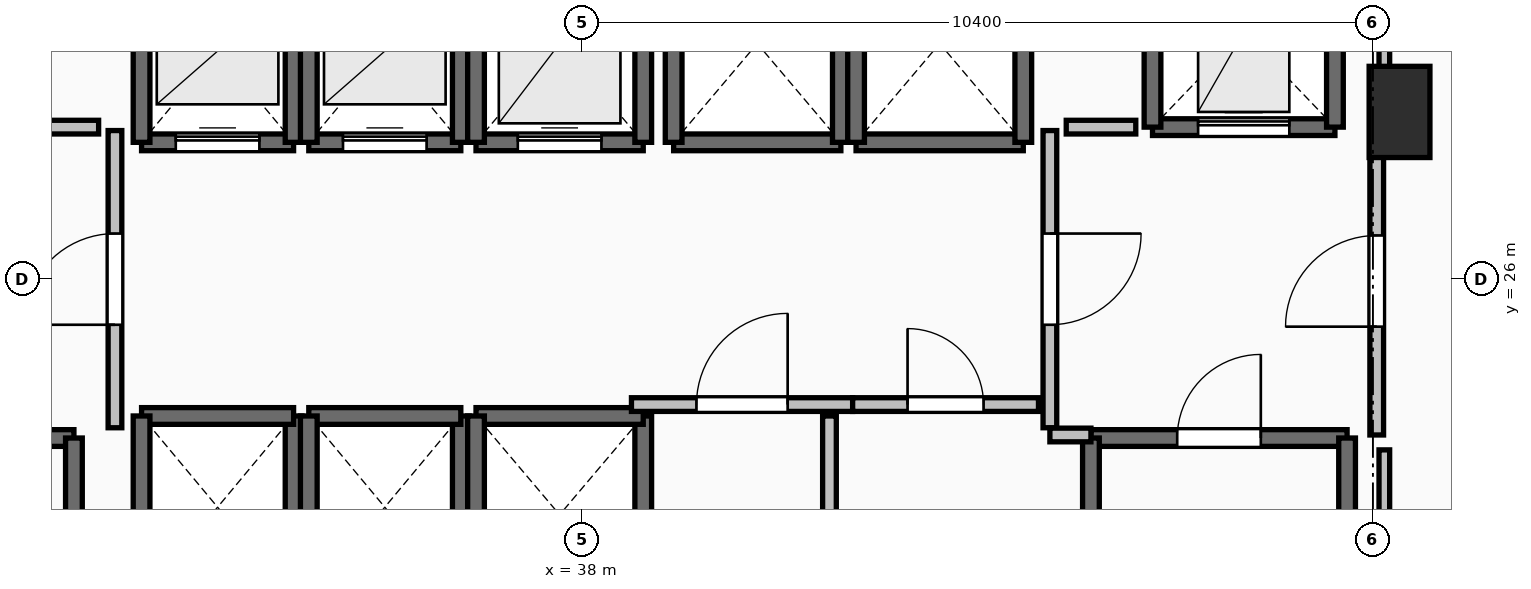
"""IFC4 building model, lengths in metres.
Left out: names, types, materials, properties, quantities, classifications, styles, units other than length and angle.
Written with IfcOpenShell. Run it as: python <this file> out.ifc"""

import sys

from ifc_helpers import new_model, si_unit, direction, frame, frame_2d, origin, origin_2d, place, context, subcontext, project, spatial, rectangle, extrude, element, fill, save


model = new_model("IFC4")
c1 = context("Model", 3, precision=1e-05, world=origin(), true_north=direction((0.0, 1.0)))
c2 = subcontext(c1, "Body", "Model", "MODEL_VIEW")
j1 = project(units=[si_unit("LENGTHUNIT", "METRE"), si_unit("PLANEANGLEUNIT", "RADIAN")], contexts=[c1])
p1 = place(None, origin())
s1 = spatial("IfcSite", under=j1, at=p1, CompositionType="ELEMENT")
p2 = place(p1, origin())
s2 = spatial("IfcBuilding", under=s1, at=p2, CompositionType="ELEMENT")
p3 = place(p2, frame((0.0, 0.0, 45.0)))
s3 = spatial("IfcBuildingStorey", under=s2, at=p3, CompositionType="ELEMENT", Elevation=45.0)
p4 = place(p3, frame((48.75, 28.2, 0.0), z_axis=(0.0, 0.0, 1.0), x_axis=(1.0, 0.0, 0.0)))
e1 = element("IfcColumn", 1, at=p4, inside=s3, PredefinedType="PILASTER", context=c2, shape_type="SweptSolid", body=[
    extrude(rectangle(XDim=0.8, YDim=1.2, at=origin_2d()), origin(), (0.0, 0.0, 1.0), 3.5),
])
p5 = place(p3, frame((27.94, 23.91, 0.0), z_axis=(0.0, 0.0, 1.0), x_axis=(1.0, 0.0, 0.0)))
e2 = element("IfcWall", 2, at=p5, inside=s3, PredefinedType="SOLIDWALL", context=c2, shape_type="SweptSolid", body=[
    extrude(rectangle(XDim=3.37, YDim=0.22, at=frame_2d((1.685, 0.0))), origin(), (0.0, 0.0, 1.0), 3.24),
])
p6 = place(p5, frame((1.135, 0.0, 0.0)))
e3 = element("IfcOpeningElement", 3, at=p6, cuts=e2, PredefinedType="OPENING", context=c2, shape_type="SweptSolid", body=[
    extrude(rectangle(XDim=1.1, YDim=2.15, at=frame_2d((0.55, 1.075))), frame((0.0, 0.125, 0.0), z_axis=(0.0, -1.0, 0.0), x_axis=(1.0, 0.0, 0.0)), (0.0, 0.0, 1.0), 0.25),
])
p7 = place(p3, frame((31.31, 23.91, 0.0), z_axis=(0.0, 0.0, 1.0), x_axis=(0.0, -1.0, 0.0)))
e4 = element("IfcWall", 4, at=p7, inside=s3, PredefinedType="SOLIDWALL", context=c2, shape_type="SweptSolid", body=[
    extrude(rectangle(XDim=7.42, YDim=0.22, at=frame_2d((3.71, 0.0))), origin(), (0.0, 0.0, 1.0), 3.24),
])
p8 = place(p3, frame((44.69, 23.91, 0.0), z_axis=(0.0, 0.0, 1.0), x_axis=(1.0, 0.0, 0.0)))
e5 = element("IfcWall", 5, at=p8, inside=s3, PredefinedType="SOLIDWALL", context=c2, shape_type="SweptSolid", body=[
    extrude(rectangle(XDim=3.37, YDim=0.22, at=frame_2d((1.685, 0.0))), origin(), (0.0, 0.0, 1.0), 3.24),
])
p9 = place(p8, frame((1.135, 0.0, 0.0)))
e6 = element("IfcOpeningElement", 6, at=p9, cuts=e5, PredefinedType="OPENING", context=c2, shape_type="SweptSolid", body=[
    extrude(rectangle(XDim=1.1, YDim=2.15, at=frame_2d((0.55, 1.075))), frame((0.0, 0.125, 0.0), z_axis=(0.0, -1.0, 0.0), x_axis=(1.0, 0.0, 0.0)), (0.0, 0.0, 1.0), 0.25),
])
for number, where, z_axis, x_axis in (
    (7, (48.06, 23.91, 0.0), (0.0, 0.0, 1.0), (0.0, -1.0, 0.0)),
    (8, (44.69, 16.49, 0.0), (0.0, 0.0, 1.0), (0.0, 1.0, 0.0)),
):
    element("IfcWall", number, at=place(p3, frame(where, z_axis=z_axis, x_axis=x_axis)), inside=s3, PredefinedType="SOLIDWALL", context=c2, shape_type="SweptSolid", body=[
        extrude(rectangle(XDim=7.42, YDim=0.22, at=frame_2d((3.71, 0.0))), origin(), (0.0, 0.0, 1.0), 3.24),
    ])
p10 = place(p3, frame((32.2, 27.8, 0.0), z_axis=(0.0, 0.0, 1.0), x_axis=(1.0, 0.0, 0.0)))
e9 = element("IfcWall", 9, at=p10, inside=s3, PredefinedType="SOLIDWALL", context=c2, shape_type="SweptSolid", body=[
    extrude(rectangle(XDim=2.0, YDim=0.22, at=frame_2d((1.0, 0.0))), origin(), (0.0, 0.0, 1.0), 3.24),
])
p11 = place(p10, frame((0.45, 0.0, 0.0)))
e10 = element("IfcOpeningElement", 10, at=p11, cuts=e9, PredefinedType="OPENING", context=c2, shape_type="SweptSolid", body=[
    extrude(rectangle(XDim=1.1, YDim=2.2, at=frame_2d((0.55, 1.1))), frame((0.0, 0.125, 0.0), z_axis=(0.0, -1.0, 0.0), x_axis=(1.0, 0.0, 0.0)), (0.0, 0.0, 1.0), 0.25),
])
for number, where, z_axis, x_axis in (
    (11, (34.2, 27.8, 0.0), (0.0, 0.0, 1.0), (0.0, 1.0, 0.0)),
    (12, (32.2, 30.2, 0.0), (0.0, 0.0, 1.0), (0.0, -1.0, 0.0)),
):
    element("IfcWall", number, at=place(p3, frame(where, z_axis=z_axis, x_axis=x_axis)), inside=s3, PredefinedType="SOLIDWALL", context=c2, shape_type="SweptSolid", body=[
        extrude(rectangle(XDim=2.4, YDim=0.22, at=frame_2d((1.2, 0.0))), origin(), (0.0, 0.0, 1.0), 3.24),
    ])
p12 = place(p3, frame((34.4, 27.8, 0.0), z_axis=(0.0, 0.0, 1.0), x_axis=(1.0, 0.0, 0.0)))
e13 = element("IfcWall", 13, at=p12, inside=s3, PredefinedType="SOLIDWALL", context=c2, shape_type="SweptSolid", body=[
    extrude(rectangle(XDim=2.0, YDim=0.22, at=frame_2d((1.0, 0.0))), origin(), (0.0, 0.0, 1.0), 3.24),
])
p13 = place(p12, frame((0.45, 0.0, 0.0)))
e14 = element("IfcOpeningElement", 14, at=p13, cuts=e13, PredefinedType="OPENING", context=c2, shape_type="SweptSolid", body=[
    extrude(rectangle(XDim=1.1, YDim=2.2, at=frame_2d((0.55, 1.1))), frame((0.0, 0.125, 0.0), z_axis=(0.0, -1.0, 0.0), x_axis=(1.0, 0.0, 0.0)), (0.0, 0.0, 1.0), 0.25),
])
for number, where, z_axis, x_axis in (
    (15, (36.4, 27.8, 0.0), (0.0, 0.0, 1.0), (0.0, 1.0, 0.0)),
    (16, (34.4, 30.2, 0.0), (0.0, 0.0, 1.0), (0.0, -1.0, 0.0)),
):
    element("IfcWall", number, at=place(p3, frame(where, z_axis=z_axis, x_axis=x_axis)), inside=s3, PredefinedType="SOLIDWALL", context=c2, shape_type="SweptSolid", body=[
        extrude(rectangle(XDim=2.4, YDim=0.22, at=frame_2d((1.2, 0.0))), origin(), (0.0, 0.0, 1.0), 3.24),
    ])
p14 = place(p3, frame((36.6, 27.8, 0.0), z_axis=(0.0, 0.0, 1.0), x_axis=(1.0, 0.0, 0.0)))
e17 = element("IfcWall", 17, at=p14, inside=s3, PredefinedType="SOLIDWALL", context=c2, shape_type="SweptSolid", body=[
    extrude(rectangle(XDim=2.2, YDim=0.22, at=frame_2d((1.1, 0.0))), origin(), (0.0, 0.0, 1.0), 3.24),
])
p15 = place(p14, frame((0.55, 0.0, 0.0)))
e18 = element("IfcOpeningElement", 18, at=p15, cuts=e17, PredefinedType="OPENING", context=c2, shape_type="SweptSolid", body=[
    extrude(rectangle(XDim=1.1, YDim=2.2, at=frame_2d((0.55, 1.1))), frame((0.0, 0.125, 0.0), z_axis=(0.0, -1.0, 0.0), x_axis=(1.0, 0.0, 0.0)), (0.0, 0.0, 1.0), 0.25),
])
for number, where, z_axis, x_axis in (
    (19, (38.8, 27.8, 0.0), (0.0, 0.0, 1.0), (0.0, 1.0, 0.0)),
    (20, (36.6, 30.4, 0.0), (0.0, 0.0, 1.0), (0.0, -1.0, 0.0)),
):
    element("IfcWall", number, at=place(p3, frame(where, z_axis=z_axis, x_axis=x_axis)), inside=s3, PredefinedType="SOLIDWALL", context=c2, shape_type="SweptSolid", body=[
        extrude(rectangle(XDim=2.6, YDim=0.22, at=frame_2d((1.3, 0.0))), origin(), (0.0, 0.0, 1.0), 3.24),
    ])
p16 = place(p3, frame((34.2, 21.8, 0.0), z_axis=(0.0, 0.0, 1.0), x_axis=(0.0, 1.0, 0.0)))
e21 = element("IfcWall", 21, at=p16, inside=s3, PredefinedType="SOLIDWALL", context=c2, shape_type="SweptSolid", body=[
    extrude(rectangle(XDim=2.4, YDim=0.22, at=frame_2d((1.2, 0.0))), origin(), (0.0, 0.0, 1.0), 3.24),
])
p17 = place(p3, frame((34.2, 24.2, 0.0), z_axis=(0.0, 0.0, 1.0), x_axis=(-1.0, 0.0, 0.0)))
e22 = element("IfcWall", 22, at=p17, inside=s3, PredefinedType="SOLIDWALL", context=c2, shape_type="SweptSolid", body=[
    extrude(rectangle(XDim=2.0, YDim=0.22, at=frame_2d((1.0, 0.0))), origin(), (0.0, 0.0, 1.0), 3.24),
])
for number, where, z_axis, x_axis in (
    (23, (32.2, 24.2, 0.0), (0.0, 0.0, 1.0), (0.0, -1.0, 0.0)),
    (24, (36.4, 21.8, 0.0), (0.0, 0.0, 1.0), (0.0, 1.0, 0.0)),
):
    element("IfcWall", number, at=place(p3, frame(where, z_axis=z_axis, x_axis=x_axis)), inside=s3, PredefinedType="SOLIDWALL", context=c2, shape_type="SweptSolid", body=[
        extrude(rectangle(XDim=2.4, YDim=0.22, at=frame_2d((1.2, 0.0))), origin(), (0.0, 0.0, 1.0), 3.24),
    ])
p18 = place(p3, frame((36.4, 24.2, 0.0), z_axis=(0.0, 0.0, 1.0), x_axis=(-1.0, 0.0, 0.0)))
e25 = element("IfcWall", 25, at=p18, inside=s3, PredefinedType="SOLIDWALL", context=c2, shape_type="SweptSolid", body=[
    extrude(rectangle(XDim=2.0, YDim=0.22, at=frame_2d((1.0, 0.0))), origin(), (0.0, 0.0, 1.0), 3.24),
])
p19 = place(p3, frame((34.4, 24.2, 0.0), z_axis=(0.0, 0.0, 1.0), x_axis=(0.0, -1.0, 0.0)))
e26 = element("IfcWall", 26, at=p19, inside=s3, PredefinedType="SOLIDWALL", context=c2, shape_type="SweptSolid", body=[
    extrude(rectangle(XDim=2.4, YDim=0.22, at=frame_2d((1.2, 0.0))), origin(), (0.0, 0.0, 1.0), 3.24),
])
p20 = place(p3, frame((38.8, 21.6, 0.0), z_axis=(0.0, 0.0, 1.0), x_axis=(0.0, 1.0, 0.0)))
e27 = element("IfcWall", 27, at=p20, inside=s3, PredefinedType="SOLIDWALL", context=c2, shape_type="SweptSolid", body=[
    extrude(rectangle(XDim=2.6, YDim=0.22, at=frame_2d((1.3, 0.0))), origin(), (0.0, 0.0, 1.0), 3.24),
])
p21 = place(p3, frame((38.8, 24.2, 0.0), z_axis=(0.0, 0.0, 1.0), x_axis=(-1.0, 0.0, 0.0)))
e28 = element("IfcWall", 28, at=p21, inside=s3, PredefinedType="SOLIDWALL", context=c2, shape_type="SweptSolid", body=[
    extrude(rectangle(XDim=2.2, YDim=0.22, at=frame_2d((1.1, 0.0))), origin(), (0.0, 0.0, 1.0), 3.24),
])
p22 = place(p3, frame((36.6, 24.2, 0.0), z_axis=(0.0, 0.0, 1.0), x_axis=(0.0, -1.0, 0.0)))
e29 = element("IfcWall", 29, at=p22, inside=s3, PredefinedType="SOLIDWALL", context=c2, shape_type="SweptSolid", body=[
    extrude(rectangle(XDim=2.6, YDim=0.22, at=frame_2d((1.3, 0.0))), origin(), (0.0, 0.0, 1.0), 3.24),
])
p23 = place(p3, frame((39.2, 27.8, 0.0), z_axis=(0.0, 0.0, 1.0), x_axis=(1.0, 0.0, 0.0)))
e30 = element("IfcWall", 30, at=p23, inside=s3, PredefinedType="SOLIDWALL", context=c2, shape_type="SweptSolid", body=[
    extrude(rectangle(XDim=2.2, YDim=0.22, at=frame_2d((1.1, 0.0))), origin(), (0.0, 0.0, 1.0), 3.24),
])
for number, where, z_axis, x_axis in (
    (31, (41.4, 27.8, 0.0), (0.0, 0.0, 1.0), (0.0, 1.0, 0.0)),
    (32, (39.2, 30.4, 0.0), (0.0, 0.0, 1.0), (0.0, -1.0, 0.0)),
):
    element("IfcWall", number, at=place(p3, frame(where, z_axis=z_axis, x_axis=x_axis)), inside=s3, PredefinedType="SOLIDWALL", context=c2, shape_type="SweptSolid", body=[
        extrude(rectangle(XDim=2.6, YDim=0.22, at=frame_2d((1.3, 0.0))), origin(), (0.0, 0.0, 1.0), 3.24),
    ])
p24 = place(p3, frame((41.6, 27.8, 0.0), z_axis=(0.0, 0.0, 1.0), x_axis=(1.0, 0.0, 0.0)))
e33 = element("IfcWall", 33, at=p24, inside=s3, PredefinedType="SOLIDWALL", context=c2, shape_type="SweptSolid", body=[
    extrude(rectangle(XDim=2.2, YDim=0.22, at=frame_2d((1.1, 0.0))), origin(), (0.0, 0.0, 1.0), 3.24),
])
for number, where, z_axis, x_axis in (
    (34, (43.8, 27.8, 0.0), (0.0, 0.0, 1.0), (0.0, 1.0, 0.0)),
    (35, (41.6, 30.4, 0.0), (0.0, 0.0, 1.0), (0.0, -1.0, 0.0)),
):
    element("IfcWall", number, at=place(p3, frame(where, z_axis=z_axis, x_axis=x_axis)), inside=s3, PredefinedType="SOLIDWALL", context=c2, shape_type="SweptSolid", body=[
        extrude(rectangle(XDim=2.6, YDim=0.22, at=frame_2d((1.3, 0.0))), origin(), (0.0, 0.0, 1.0), 3.24),
    ])
p25 = place(p3, frame((45.5, 28.0, 0.0), z_axis=(0.0, 0.0, 1.0), x_axis=(1.0, 0.0, 0.0)))
e36 = element("IfcWall", 36, at=p25, inside=s3, PredefinedType="SHEAR", context=c2, shape_type="SweptSolid", body=[
    extrude(rectangle(XDim=2.4, YDim=0.22, at=frame_2d((1.2, 0.0))), origin(), (0.0, 0.0, 1.0), 3.24),
])
p26 = place(p25, frame((0.6, 0.0, 0.0)))
e37 = element("IfcOpeningElement", 37, at=p26, cuts=e36, PredefinedType="OPENING", context=c2, shape_type="SweptSolid", body=[
    extrude(rectangle(XDim=1.2, YDim=2.2, at=frame_2d((0.6, 1.1))), frame((0.0, 0.125, 0.0), z_axis=(0.0, -1.0, 0.0), x_axis=(1.0, 0.0, 0.0)), (0.0, 0.0, 1.0), 0.25),
])
for number, where, z_axis, x_axis in (
    (38, (47.9, 28.0, 0.0), (0.0, 0.0, 1.0), (0.0, 1.0, 0.0)),
    (39, (45.5, 30.5, 0.0), (0.0, 0.0, 1.0), (0.0, -1.0, 0.0)),
):
    element("IfcWall", number, at=place(p3, frame(where, z_axis=z_axis, x_axis=x_axis)), inside=s3, PredefinedType="SHEAR", context=c2, shape_type="SweptSolid", body=[
        extrude(rectangle(XDim=2.5, YDim=0.22, at=frame_2d((1.25, 0.0))), origin(), (0.0, 0.0, 1.0), 3.24),
    ])
p27 = place(p3, frame((31.85, 24.045, 0.0), z_axis=(0.0, 0.0, 1.0), x_axis=(0.0, 1.0, 0.0)))
e40 = element("IfcWall", 40, at=p27, inside=s3, PredefinedType="PARTITIONING", context=c2, shape_type="SweptSolid", body=[
    extrude(rectangle(XDim=3.91, YDim=0.18, at=frame_2d((1.955, 0.0))), origin(), (0.0, 0.0, 1.0), 3.24),
])
p28 = place(p27, frame((1.355, 0.0, 0.0)))
e41 = element("IfcOpeningElement", 41, at=p28, cuts=e40, PredefinedType="OPENING", context=c2, shape_type="SweptSolid", body=[
    extrude(rectangle(XDim=1.2, YDim=2.15, at=frame_2d((0.6, 1.075))), frame((0.0, 0.105, 0.0), z_axis=(0.0, -1.0, 0.0), x_axis=(1.0, 0.0, 0.0)), (0.0, 0.0, 1.0), 0.21),
])
p29 = place(p3, frame((44.15, 27.955, 0.0), z_axis=(0.0, 0.0, 1.0), x_axis=(0.0, -1.0, 0.0)))
e42 = element("IfcWall", 42, at=p29, inside=s3, PredefinedType="PARTITIONING", context=c2, shape_type="SweptSolid", body=[
    extrude(rectangle(XDim=3.91, YDim=0.18, at=frame_2d((1.955, 0.0))), origin(), (0.0, 0.0, 1.0), 3.24),
])
p30 = place(p29, frame((1.355, 0.0, 0.0)))
e43 = element("IfcOpeningElement", 43, at=p30, cuts=e42, PredefinedType="OPENING", context=c2, shape_type="SweptSolid", body=[
    extrude(rectangle(XDim=1.2, YDim=2.15, at=frame_2d((0.6, 1.075))), frame((0.0, 0.105, 0.0), z_axis=(0.0, -1.0, 0.0), x_axis=(1.0, 0.0, 0.0)), (0.0, 0.0, 1.0), 0.21),
])
p31 = place(p3, frame((44.15, 23.95, 0.0), z_axis=(0.0, 0.0, 1.0), x_axis=(1.0, 0.0, 0.0)))
e44 = element("IfcWall", 44, at=p31, inside=s3, PredefinedType="PARTITIONING", context=c2, shape_type="SweptSolid", body=[
    extrude(rectangle(XDim=0.54, YDim=0.18, at=frame_2d((0.27, 0.0))), origin(), (0.0, 0.0, 1.0), 3.24),
])
p32 = place(p3, frame((48.45, 23.95, 0.0), z_axis=(0.0, 0.0, 1.0), x_axis=(0.0, 1.0, 0.0)))
e45 = element("IfcWall", 45, at=p32, inside=s3, PredefinedType="PARTITIONING", context=c2, shape_type="SweptSolid", body=[
    extrude(rectangle(XDim=4.05, YDim=0.18, at=frame_2d((2.025, 0.0))), origin(), (0.0, 0.0, 1.0), 3.24),
])
p33 = place(p32, frame((1.425, 0.0, 0.0)))
e46 = element("IfcOpeningElement", 46, at=p33, cuts=e45, PredefinedType="OPENING", context=c2, shape_type="SweptSolid", body=[
    extrude(rectangle(XDim=1.2, YDim=2.15, at=frame_2d((0.6, 1.075))), frame((0.0, 0.105, 0.0), z_axis=(0.0, -1.0, 0.0), x_axis=(1.0, 0.0, 0.0)), (0.0, 0.0, 1.0), 0.21),
])
p34 = place(p3, frame((38.645, 24.35, 0.0), z_axis=(0.0, 0.0, 1.0), x_axis=(1.0, 0.0, 0.0)))
e47 = element("IfcWall", 47, at=p34, inside=s3, PredefinedType="PARTITIONING", context=c2, shape_type="SweptSolid", body=[
    extrude(rectangle(XDim=2.91, YDim=0.18, at=frame_2d((1.455, 0.0))), origin(), (0.0, 0.0, 1.0), 3.24),
])
p35 = place(p34, frame((0.855, 0.0, 0.0)))
e48 = element("IfcOpeningElement", 48, at=p35, cuts=e47, PredefinedType="OPENING", context=c2, shape_type="SweptSolid", body=[
    extrude(rectangle(XDim=1.2, YDim=2.15, at=frame_2d((0.6, 1.075))), frame((0.0, 0.105, 0.0), z_axis=(0.0, -1.0, 0.0), x_axis=(1.0, 0.0, 0.0)), (0.0, 0.0, 1.0), 0.21),
])
p36 = place(p3, frame((41.555, 24.35, 0.0), z_axis=(0.0, 0.0, 1.0), x_axis=(1.0, 0.0, 0.0)))
e49 = element("IfcWall", 49, at=p36, inside=s3, PredefinedType="PARTITIONING", context=c2, shape_type="SweptSolid", body=[
    extrude(rectangle(XDim=2.445, YDim=0.18, at=frame_2d((1.223, 0.0))), origin(), (0.0, 0.0, 1.0), 3.24),
])
p37 = place(p36, frame((0.722, 0.0, 0.0)))
e50 = element("IfcOpeningElement", 50, at=p37, cuts=e49, PredefinedType="OPENING", context=c2, shape_type="SweptSolid", body=[
    extrude(rectangle(XDim=1.0, YDim=2.15, at=frame_2d((0.5, 1.075))), frame((0.0, 0.105, 0.0), z_axis=(0.0, -1.0, 0.0), x_axis=(1.0, 0.0, 0.0)), (0.0, 0.0, 1.0), 0.21),
])
p38 = place(p3, frame((41.25, 20.305, 0.0), z_axis=(0.0, 0.0, 1.0), x_axis=(0.0, 1.0, 0.0)))
e51 = element("IfcWall", 51, at=p38, inside=s3, PredefinedType="PARTITIONING", context=c2, shape_type="SweptSolid", body=[
    extrude(rectangle(XDim=3.895, YDim=0.18, at=frame_2d((1.948, 0.0))), origin(), (0.0, 0.0, 1.0), 3.24),
])
p39 = place(p38, frame((1.448, 0.0, 0.0)))
e52 = element("IfcOpeningElement", 52, at=p39, cuts=e51, PredefinedType="OPENING", context=c2, shape_type="SweptSolid", body=[
    extrude(rectangle(XDim=1.0, YDim=2.15, at=frame_2d((0.5, 1.075))), frame((0.0, 0.105, 0.0), z_axis=(0.0, -1.0, 0.0), x_axis=(1.0, 0.0, 0.0)), (0.0, 0.0, 1.0), 0.21),
])
for number, where, z_axis, x_axis in (
    (53, (31.635, 28.0, 0.0), (0.0, 0.0, 1.0), (-1.0, 0.0, 0.0)),
    (54, (45.28, 28.0, 0.0), (0.0, 0.0, 1.0), (-1.0, 0.0, 0.0)),
):
    element("IfcWall", number, at=place(p3, frame(where, z_axis=z_axis, x_axis=x_axis)), inside=s3, PredefinedType="PARTITIONING", context=c2, shape_type="SweptSolid", body=[
        extrude(rectangle(XDim=0.915, YDim=0.18, at=frame_2d((0.458, 0.0))), origin(), (0.0, 0.0, 1.0), 3.24),
    ])
p40 = place(p3, frame((48.55, 33.45, 0.0), z_axis=(0.0, 0.0, 1.0), x_axis=(0.0, -1.0, 0.0)))
e55 = element("IfcWall", 55, at=p40, inside=s3, PredefinedType="PARTITIONING", context=c2, shape_type="SweptSolid", body=[
    extrude(rectangle(XDim=5.254, YDim=0.14, at=frame_2d((2.627, 0.0))), origin(), (0.0, 0.0, 1.0), 2.432),
])
p41 = place(p3, frame((48.55, 23.754, 0.0), z_axis=(0.0, 0.0, 1.0), x_axis=(0.0, -1.0, 0.0)))
e56 = element("IfcWall", 56, at=p41, inside=s3, PredefinedType="PARTITIONING", context=c2, shape_type="SweptSolid", body=[
    extrude(rectangle(XDim=7.514, YDim=0.14, at=frame_2d((3.757, 0.0))), origin(), (0.0, 0.0, 1.0), 2.432),
])
p42 = place(p9, origin())
e57 = element("IfcDoor", 57, at=p42, inside=s3, OperationType="SINGLE_SWING_RIGHT", PredefinedType="DOOR", context=c2, shape_type="SweptSolid", body=[
    extrude(rectangle(XDim=1.1, YDim=2.15, at=frame_2d((0.55, 1.075))), frame((0.0, 0.025, 0.0), z_axis=(0.0, -1.0, 0.0), x_axis=(1.0, 0.0, 0.0)), (0.0, 0.0, 1.0), 0.05),
])
fill(e6, e57)
p43 = place(p11, origin())
e58 = element("IfcDoor", 58, at=p43, inside=s3, OperationType="SLIDING_TO_LEFT", PredefinedType="DOOR", context=c2, shape_type="SweptSolid", body=[
    extrude(rectangle(XDim=1.1, YDim=2.2, at=frame_2d((0.55, 1.1))), frame((0.0, 0.025, 0.0), z_axis=(0.0, -1.0, 0.0), x_axis=(1.0, 0.0, 0.0)), (0.0, 0.0, 1.0), 0.05),
])
fill(e10, e58)
p44 = place(p13, origin())
e59 = element("IfcDoor", 59, at=p44, inside=s3, OperationType="SLIDING_TO_LEFT", PredefinedType="DOOR", context=c2, shape_type="SweptSolid", body=[
    extrude(rectangle(XDim=1.1, YDim=2.2, at=frame_2d((0.55, 1.1))), frame((0.0, 0.025, 0.0), z_axis=(0.0, -1.0, 0.0), x_axis=(1.0, 0.0, 0.0)), (0.0, 0.0, 1.0), 0.05),
])
fill(e14, e59)
p45 = place(p15, origin())
e60 = element("IfcDoor", 60, at=p45, inside=s3, OperationType="SLIDING_TO_LEFT", PredefinedType="DOOR", context=c2, shape_type="SweptSolid", body=[
    extrude(rectangle(XDim=1.1, YDim=2.2, at=frame_2d((0.55, 1.1))), frame((0.0, 0.025, 0.0), z_axis=(0.0, -1.0, 0.0), x_axis=(1.0, 0.0, 0.0)), (0.0, 0.0, 1.0), 0.05),
])
fill(e18, e60)
p46 = place(p26, origin())
e61 = element("IfcDoor", 61, at=p46, inside=s3, OperationType="SLIDING_TO_LEFT", PredefinedType="DOOR", context=c2, shape_type="SweptSolid", body=[
    extrude(rectangle(XDim=1.2, YDim=2.2, at=frame_2d((0.6, 1.1))), frame((0.0, 0.025, 0.0), z_axis=(0.0, -1.0, 0.0), x_axis=(1.0, 0.0, 0.0)), (0.0, 0.0, 1.0), 0.05),
])
fill(e37, e61)
p47 = place(p28, origin())
e62 = element("IfcDoor", 62, at=p47, inside=s3, OperationType="SINGLE_SWING_LEFT", PredefinedType="DOOR", context=c2, shape_type="SweptSolid", body=[
    extrude(rectangle(XDim=1.2, YDim=2.15, at=frame_2d((0.6, 1.075))), frame((0.0, 0.025, 0.0), z_axis=(0.0, -1.0, 0.0), x_axis=(1.0, 0.0, 0.0)), (0.0, 0.0, 1.0), 0.05),
])
fill(e41, e62)
p48 = place(p30, origin())
e63 = element("IfcDoor", 63, at=p48, inside=s3, OperationType="SINGLE_SWING_LEFT", PredefinedType="DOOR", context=c2, shape_type="SweptSolid", body=[
    extrude(rectangle(XDim=1.2, YDim=2.15, at=frame_2d((0.6, 1.075))), frame((0.0, 0.025, 0.0), z_axis=(0.0, -1.0, 0.0), x_axis=(1.0, 0.0, 0.0)), (0.0, 0.0, 1.0), 0.05),
])
fill(e43, e63)
p49 = place(p33, origin())
e64 = element("IfcDoor", 64, at=p49, inside=s3, OperationType="SINGLE_SWING_LEFT", PredefinedType="DOOR", context=c2, shape_type="SweptSolid", body=[
    extrude(rectangle(XDim=1.2, YDim=2.15, at=frame_2d((0.6, 1.075))), frame((0.0, 0.025, 0.0), z_axis=(0.0, -1.0, 0.0), x_axis=(1.0, 0.0, 0.0)), (0.0, 0.0, 1.0), 0.05),
])
fill(e46, e64)
p50 = place(p35, origin())
e65 = element("IfcDoor", 65, at=p50, inside=s3, OperationType="SINGLE_SWING_RIGHT", PredefinedType="DOOR", context=c2, shape_type="SweptSolid", body=[
    extrude(rectangle(XDim=1.2, YDim=2.15, at=frame_2d((0.6, 1.075))), frame((0.0, 0.025, 0.0), z_axis=(0.0, -1.0, 0.0), x_axis=(1.0, 0.0, 0.0)), (0.0, 0.0, 1.0), 0.05),
])
fill(e48, e65)
p51 = place(p37, origin())
e66 = element("IfcDoor", 66, at=p51, inside=s3, OperationType="SINGLE_SWING_LEFT", PredefinedType="DOOR", context=c2, shape_type="SweptSolid", body=[
    extrude(rectangle(XDim=1.0, YDim=2.15, at=frame_2d((0.5, 1.075))), frame((0.0, 0.025, 0.0), z_axis=(0.0, -1.0, 0.0), x_axis=(1.0, 0.0, 0.0)), (0.0, 0.0, 1.0), 0.05),
])
fill(e50, e66)
save(model, sys.argv[1])
